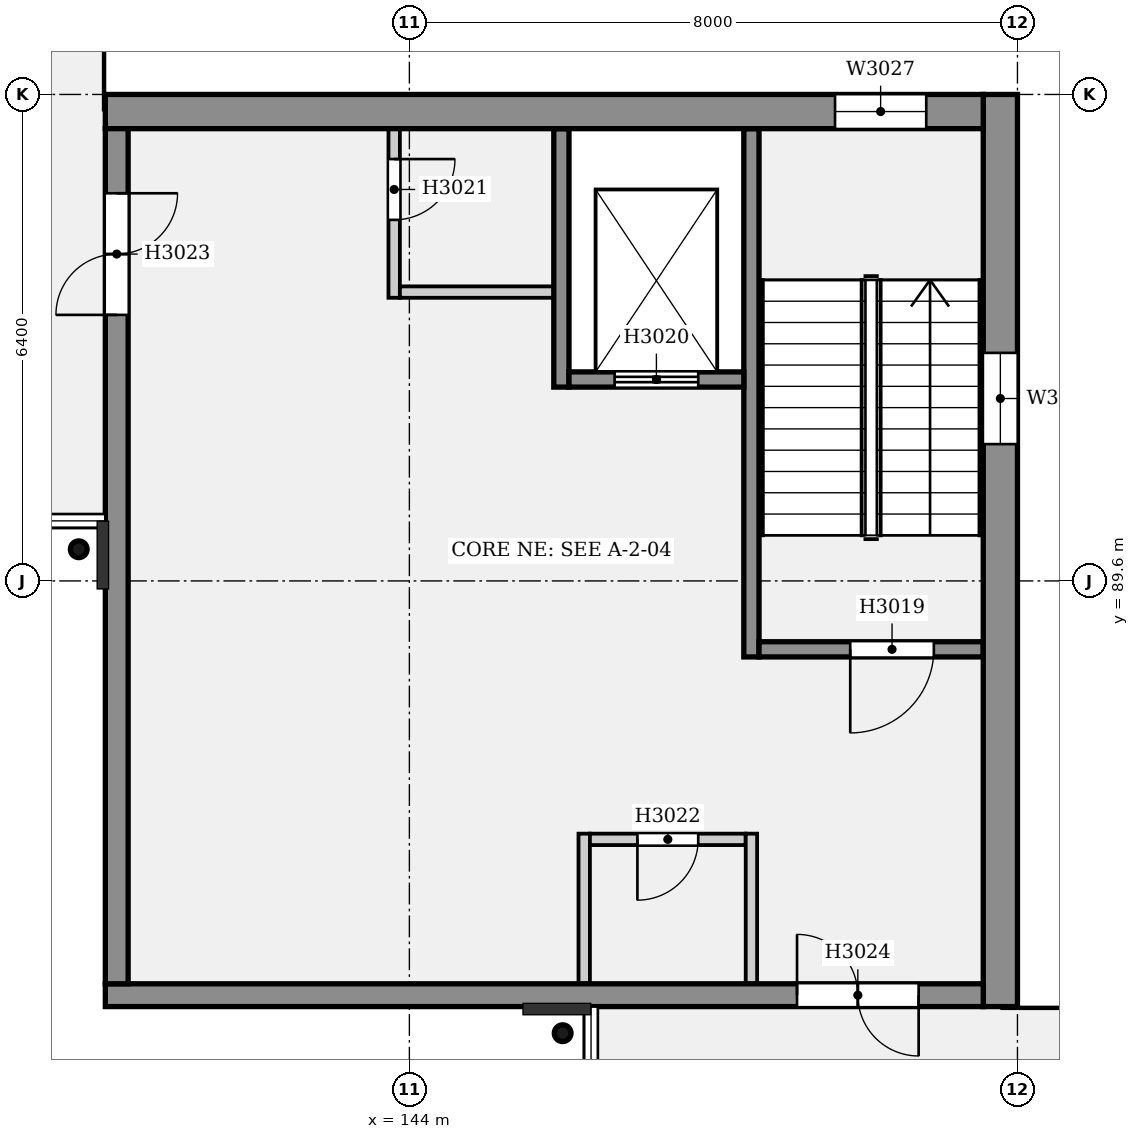
"""IFC4 building model, lengths in metres.
Left out: names, types, materials, properties, quantities, classifications, styles, units other than length and angle.
Written with IfcOpenShell. Run it as: python <this file> out.ifc"""

import sys

from ifc_helpers import new_model, si_unit, direction, frame, frame_2d, origin, origin_2d, place, context, subcontext, project, spatial, rectangle, hollow_circle, extrude, element, fill, save


model = new_model("IFC4")
c1 = context("Model", 3, precision=1e-05, world=origin(), true_north=direction((0.0, 1.0)))
c2 = subcontext(c1, "Body", "Model", "MODEL_VIEW")
j1 = project(units=[si_unit("LENGTHUNIT", "METRE"), si_unit("PLANEANGLEUNIT", "RADIAN")], contexts=[c1])
p1 = place(None, origin())
s1 = spatial("IfcSite", under=j1, at=p1, CompositionType="ELEMENT")
p2 = place(p1, origin())
s2 = spatial("IfcBuilding", under=s1, at=p2, CompositionType="ELEMENT")
p3 = place(p2, frame((0.0, 0.0, 13.8)))
s3 = spatial("IfcBuildingStorey", under=s2, at=p3, CompositionType="ELEMENT", Elevation=13.8)
p4 = place(p3, frame((151.775, 96.0, 0.0), z_axis=(0.0, 0.0, 1.0), x_axis=(0.0, -1.0, 0.0)))
e1 = element("IfcWall", 1, at=p4, inside=s3, PredefinedType="ELEMENTEDWALL", context=c2, shape_type="SweptSolid", body=[
    extrude(rectangle(XDim=12.0, YDim=0.45, at=frame_2d((6.0, 0.0))), origin(), (0.0, 0.0, 1.0), 4.4),
])
p5 = place(p4, frame((3.4, 0.0, 0.6)))
e2 = element("IfcOpeningElement", 2, at=p5, cuts=e1, PredefinedType="OPENING", context=c2, shape_type="SweptSolid", body=[
    extrude(rectangle(XDim=1.2, YDim=3.0, at=frame_2d((0.6, 1.5))), frame((0.0, 0.235, 0.0), z_axis=(0.0, -1.0, 0.0), x_axis=(1.0, 0.0, 0.0)), (0.0, 0.0, 1.0), 0.47),
])
p6 = place(p3, frame((151.55, 95.775, 0.0), z_axis=(0.0, 0.0, 1.0), x_axis=(-1.0, 0.0, 0.0)))
e3 = element("IfcWall", 3, at=p6, inside=s3, PredefinedType="ELEMENTEDWALL", context=c2, shape_type="SweptSolid", body=[
    extrude(rectangle(XDim=11.55, YDim=0.45, at=frame_2d((5.775, 0.0))), origin(), (0.0, 0.0, 1.0), 4.4),
])
p7 = place(p6, frame((0.75, 0.0, 0.6)))
e4 = element("IfcOpeningElement", 4, at=p7, cuts=e3, PredefinedType="OPENING", context=c2, shape_type="SweptSolid", body=[
    extrude(rectangle(XDim=1.2, YDim=3.0, at=frame_2d((0.6, 1.5))), frame((0.0, 0.235, 0.0), z_axis=(0.0, -1.0, 0.0), x_axis=(1.0, 0.0, 0.0)), (0.0, 0.0, 1.0), 0.47),
])
p8 = place(p3, frame((140.15, 95.55, 0.0), z_axis=(0.0, 0.0, 1.0), x_axis=(0.0, -1.0, 0.0)))
e5 = element("IfcWall", 5, at=p8, inside=s3, PredefinedType="SOLIDWALL", context=c2, shape_type="SweptSolid", body=[
    extrude(rectangle(XDim=11.25, YDim=0.3, at=frame_2d((5.625, 0.0))), origin(), (0.0, 0.0, 1.0), 4.4),
])
p9 = place(p8, frame((0.85, 0.0, 0.0)))
e6 = element("IfcOpeningElement", 6, at=p9, cuts=e5, PredefinedType="OPENING", context=c2, shape_type="SweptSolid", body=[
    extrude(rectangle(XDim=1.6, YDim=2.1, at=frame_2d((0.8, 1.05))), frame((0.0, 0.16, 0.0), z_axis=(0.0, -1.0, 0.0), x_axis=(1.0, 0.0, 0.0)), (0.0, 0.0, 1.0), 0.32),
])
p10 = place(p3, frame((151.55, 84.15, 0.0), z_axis=(0.0, 0.0, 1.0), x_axis=(-1.0, 0.0, 0.0)))
e7 = element("IfcWall", 7, at=p10, inside=s3, PredefinedType="SOLIDWALL", context=c2, shape_type="SweptSolid", body=[
    extrude(rectangle(XDim=11.55, YDim=0.3, at=frame_2d((5.775, 0.0))), origin(), (0.0, 0.0, 1.0), 4.4),
])
p11 = place(p10, frame((0.85, 0.0, 0.0)))
e8 = element("IfcOpeningElement", 8, at=p11, cuts=e7, PredefinedType="OPENING", context=c2, shape_type="SweptSolid", body=[
    extrude(rectangle(XDim=1.6, YDim=2.1, at=frame_2d((0.8, 1.05))), frame((0.0, 0.16, 0.0), z_axis=(0.0, -1.0, 0.0), x_axis=(1.0, 0.0, 0.0)), (0.0, 0.0, 1.0), 0.32),
])
for number, where, z_axis, x_axis in (
    (9, (139.65, 90.016, -0.128), (0.0, -0.199, 0.98), (1.0, 0.0, 0.0)),
    (10, (146.016, 83.65, -0.128), (-0.199, 0.0, 0.98), (0.0, -1.0, 0.0)),
):
    element("IfcColumn", number, at=place(p3, frame(where, z_axis=z_axis, x_axis=x_axis)), inside=s3, PredefinedType="COLUMN", context=c2, shape_type="SweptSolid", body=[
        extrude(hollow_circle(Radius=0.11, WallThickness=0.013, at=origin_2d()), origin(), (0.0, 0.0, 1.0), 4.621),
    ])
p12 = place(p3, frame((148.5, 95.55, 0.0), z_axis=(0.0, 0.0, 1.0), x_axis=(0.0, -1.0, 0.0)))
e11 = element("IfcWall", 11, at=p12, inside=s3, PredefinedType="SOLIDWALL", context=c2, shape_type="SweptSolid", body=[
    extrude(rectangle(XDim=6.95, YDim=0.2, at=frame_2d((3.475, 0.0))), origin(), (0.0, 0.0, 1.0), 4.4),
])
p13 = place(p3, frame((151.55, 88.7, 0.0), z_axis=(0.0, 0.0, 1.0), x_axis=(-1.0, 0.0, 0.0)))
e12 = element("IfcWall", 12, at=p13, inside=s3, PredefinedType="SOLIDWALL", context=c2, shape_type="SweptSolid", body=[
    extrude(rectangle(XDim=2.95, YDim=0.2, at=frame_2d((1.475, 0.0))), origin(), (0.0, 0.0, 1.0), 4.4),
])
p14 = place(p13, frame((0.65, 0.0, 0.0)))
e13 = element("IfcOpeningElement", 13, at=p14, cuts=e12, PredefinedType="OPENING", context=c2, shape_type="SweptSolid", body=[
    extrude(rectangle(XDim=1.1, YDim=2.1, at=frame_2d((0.55, 1.05))), frame((0.0, 0.11, 0.0), z_axis=(0.0, -1.0, 0.0), x_axis=(1.0, 0.0, 0.0)), (0.0, 0.0, 1.0), 0.22),
])
p15 = place(p3, frame((146.0, 95.55, 0.0), z_axis=(0.0, 0.0, 1.0), x_axis=(0.0, -1.0, 0.0)))
e14 = element("IfcWall", 14, at=p15, inside=s3, PredefinedType="SOLIDWALL", context=c2, shape_type="SweptSolid", body=[
    extrude(rectangle(XDim=3.4, YDim=0.2, at=frame_2d((1.7, 0.0))), origin(), (0.0, 0.0, 1.0), 4.4),
])
p16 = place(p3, frame((148.4, 92.25, 0.0), z_axis=(0.0, 0.0, 1.0), x_axis=(-1.0, 0.0, 0.0)))
e15 = element("IfcWall", 15, at=p16, inside=s3, PredefinedType="SOLIDWALL", context=c2, shape_type="SweptSolid", body=[
    extrude(rectangle(XDim=2.3, YDim=0.2, at=frame_2d((1.15, 0.0))), origin(), (0.0, 0.0, 1.0), 4.4),
])
p17 = place(p16, frame((0.6, 0.0, 0.0)))
e16 = element("IfcOpeningElement", 16, at=p17, cuts=e15, PredefinedType="OPENING", context=c2, shape_type="SweptSolid", body=[
    extrude(rectangle(XDim=1.1, YDim=2.1, at=frame_2d((0.55, 1.05))), frame((0.0, 0.11, 0.0), z_axis=(0.0, -1.0, 0.0), x_axis=(1.0, 0.0, 0.0)), (0.0, 0.0, 1.0), 0.22),
])
p18 = place(p3, frame((145.9, 93.4, 0.0), z_axis=(0.0, 0.0, 1.0), x_axis=(-1.0, 0.0, 0.0)))
e17 = element("IfcWall", 17, at=p18, inside=s3, PredefinedType="PARTITIONING", context=c2, shape_type="SweptSolid", body=[
    extrude(rectangle(XDim=2.025, YDim=0.15, at=frame_2d((1.012, 0.0))), origin(), (0.0, 0.0, 1.0), 4.15),
])
p19 = place(p3, frame((143.8, 95.55, 0.0), z_axis=(0.0, 0.0, 1.0), x_axis=(0.0, -1.0, 0.0)))
e18 = element("IfcWall", 18, at=p19, inside=s3, PredefinedType="PARTITIONING", context=c2, shape_type="SweptSolid", body=[
    extrude(rectangle(XDim=2.225, YDim=0.15, at=frame_2d((1.113, 0.0))), origin(), (0.0, 0.0, 1.0), 4.15),
])
p20 = place(p19, frame((0.4, 0.0, 0.0)))
e19 = element("IfcOpeningElement", 19, at=p20, cuts=e18, PredefinedType="OPENING", context=c2, shape_type="SweptSolid", body=[
    extrude(rectangle(XDim=0.8, YDim=2.1, at=frame_2d((0.4, 1.05))), frame((0.0, 0.085, 0.0), z_axis=(0.0, -1.0, 0.0), x_axis=(1.0, 0.0, 0.0)), (0.0, 0.0, 1.0), 0.17),
])
p21 = place(p3, frame((148.425, 86.2, 0.0), z_axis=(0.0, 0.0, 1.0), x_axis=(-1.0, 0.0, 0.0)))
e20 = element("IfcWall", 20, at=p21, inside=s3, PredefinedType="PARTITIONING", context=c2, shape_type="SweptSolid", body=[
    extrude(rectangle(XDim=2.05, YDim=0.15, at=frame_2d((1.025, 0.0))), origin(), (0.0, 0.0, 1.0), 4.15),
])
p22 = place(p21, frame((0.625, 0.0, 0.0)))
e21 = element("IfcOpeningElement", 21, at=p22, cuts=e20, PredefinedType="OPENING", context=c2, shape_type="SweptSolid", body=[
    extrude(rectangle(XDim=0.8, YDim=2.1, at=frame_2d((0.4, 1.05))), frame((0.0, 0.085, 0.0), z_axis=(0.0, -1.0, 0.0), x_axis=(1.0, 0.0, 0.0)), (0.0, 0.0, 1.0), 0.17),
])
for number, where, z_axis, x_axis in (
    (22, (148.5, 86.275, 0.0), (0.0, 0.0, 1.0), (0.0, -1.0, 0.0)),
    (23, (146.3, 86.275, 0.0), (0.0, 0.0, 1.0), (0.0, -1.0, 0.0)),
):
    element("IfcWall", number, at=place(p3, frame(where, z_axis=z_axis, x_axis=x_axis)), inside=s3, PredefinedType="PARTITIONING", context=c2, shape_type="SweptSolid", body=[
        extrude(rectangle(XDim=1.975, YDim=0.15, at=frame_2d((0.987, 0.0))), origin(), (0.0, 0.0, 1.0), 4.15),
    ])
p23 = place(p14, origin())
e24 = element("IfcDoor", 24, at=p23, inside=s3, OperationType="SINGLE_SWING_RIGHT", PredefinedType="DOOR", context=c2, shape_type="SweptSolid", body=[
    extrude(rectangle(XDim=1.1, YDim=2.1, at=frame_2d((0.55, 1.05))), frame((0.0, 0.025, 0.0), z_axis=(0.0, -1.0, 0.0), x_axis=(1.0, 0.0, 0.0)), (0.0, 0.0, 1.0), 0.05),
])
fill(e13, e24)
p24 = place(p17, origin())
e25 = element("IfcDoor", 25, at=p24, inside=s3, OperationType="DOUBLE_DOOR_SLIDING", PredefinedType="DOOR", context=c2, shape_type="SweptSolid", body=[
    extrude(rectangle(XDim=1.1, YDim=2.1, at=frame_2d((0.55, 1.05))), frame((0.0, 0.025, 0.0), z_axis=(0.0, -1.0, 0.0), x_axis=(1.0, 0.0, 0.0)), (0.0, 0.0, 1.0), 0.05),
])
fill(e16, e25)
p25 = place(p20, origin())
e26 = element("IfcDoor", 26, at=p25, inside=s3, OperationType="SINGLE_SWING_LEFT", PredefinedType="DOOR", context=c2, shape_type="SweptSolid", body=[
    extrude(rectangle(XDim=0.8, YDim=2.1, at=frame_2d((0.4, 1.05))), frame((0.0, 0.025, 0.0), z_axis=(0.0, -1.0, 0.0), x_axis=(1.0, 0.0, 0.0)), (0.0, 0.0, 1.0), 0.05),
])
fill(e19, e26)
p26 = place(p22, origin())
e27 = element("IfcDoor", 27, at=p26, inside=s3, OperationType="SINGLE_SWING_RIGHT", PredefinedType="DOOR", context=c2, shape_type="SweptSolid", body=[
    extrude(rectangle(XDim=0.8, YDim=2.1, at=frame_2d((0.4, 1.05))), frame((0.0, 0.025, 0.0), z_axis=(0.0, -1.0, 0.0), x_axis=(1.0, 0.0, 0.0)), (0.0, 0.0, 1.0), 0.05),
])
fill(e21, e27)
p27 = place(p9, origin())
e28 = element("IfcDoor", 28, at=p27, inside=s3, OperationType="DOUBLE_DOOR_SINGLE_SWING", PredefinedType="DOOR", context=c2, shape_type="SweptSolid", body=[
    extrude(rectangle(XDim=1.6, YDim=2.1, at=frame_2d((0.8, 1.05))), frame((0.0, 0.025, 0.0), z_axis=(0.0, -1.0, 0.0), x_axis=(1.0, 0.0, 0.0)), (0.0, 0.0, 1.0), 0.05),
])
fill(e6, e28)
p28 = place(p11, origin())
e29 = element("IfcDoor", 29, at=p28, inside=s3, OperationType="DOUBLE_DOOR_SINGLE_SWING", PredefinedType="DOOR", context=c2, shape_type="SweptSolid", body=[
    extrude(rectangle(XDim=1.6, YDim=2.1, at=frame_2d((0.8, 1.05))), frame((0.0, 0.025, 0.0), z_axis=(0.0, -1.0, 0.0), x_axis=(1.0, 0.0, 0.0)), (0.0, 0.0, 1.0), 0.05),
])
fill(e8, e29)
p29 = place(p5, origin())
e30 = element("IfcWindow", 30, at=p29, inside=s3, PartitioningType="SINGLE_PANEL", PredefinedType="WINDOW", context=c2, shape_type="SweptSolid", body=[
    extrude(rectangle(XDim=1.2, YDim=3.0, at=frame_2d((0.6, 1.5))), frame((0.0, 0.03, 0.0), z_axis=(0.0, -1.0, 0.0), x_axis=(1.0, 0.0, 0.0)), (0.0, 0.0, 1.0), 0.06),
])
fill(e2, e30)
p30 = place(p7, origin())
e31 = element("IfcWindow", 31, at=p30, inside=s3, PartitioningType="SINGLE_PANEL", PredefinedType="WINDOW", context=c2, shape_type="SweptSolid", body=[
    extrude(rectangle(XDim=1.2, YDim=3.0, at=frame_2d((0.6, 1.5))), frame((0.0, 0.03, 0.0), z_axis=(0.0, -1.0, 0.0), x_axis=(1.0, 0.0, 0.0)), (0.0, 0.0, 1.0), 0.06),
])
fill(e4, e31)
save(model, sys.argv[1])
